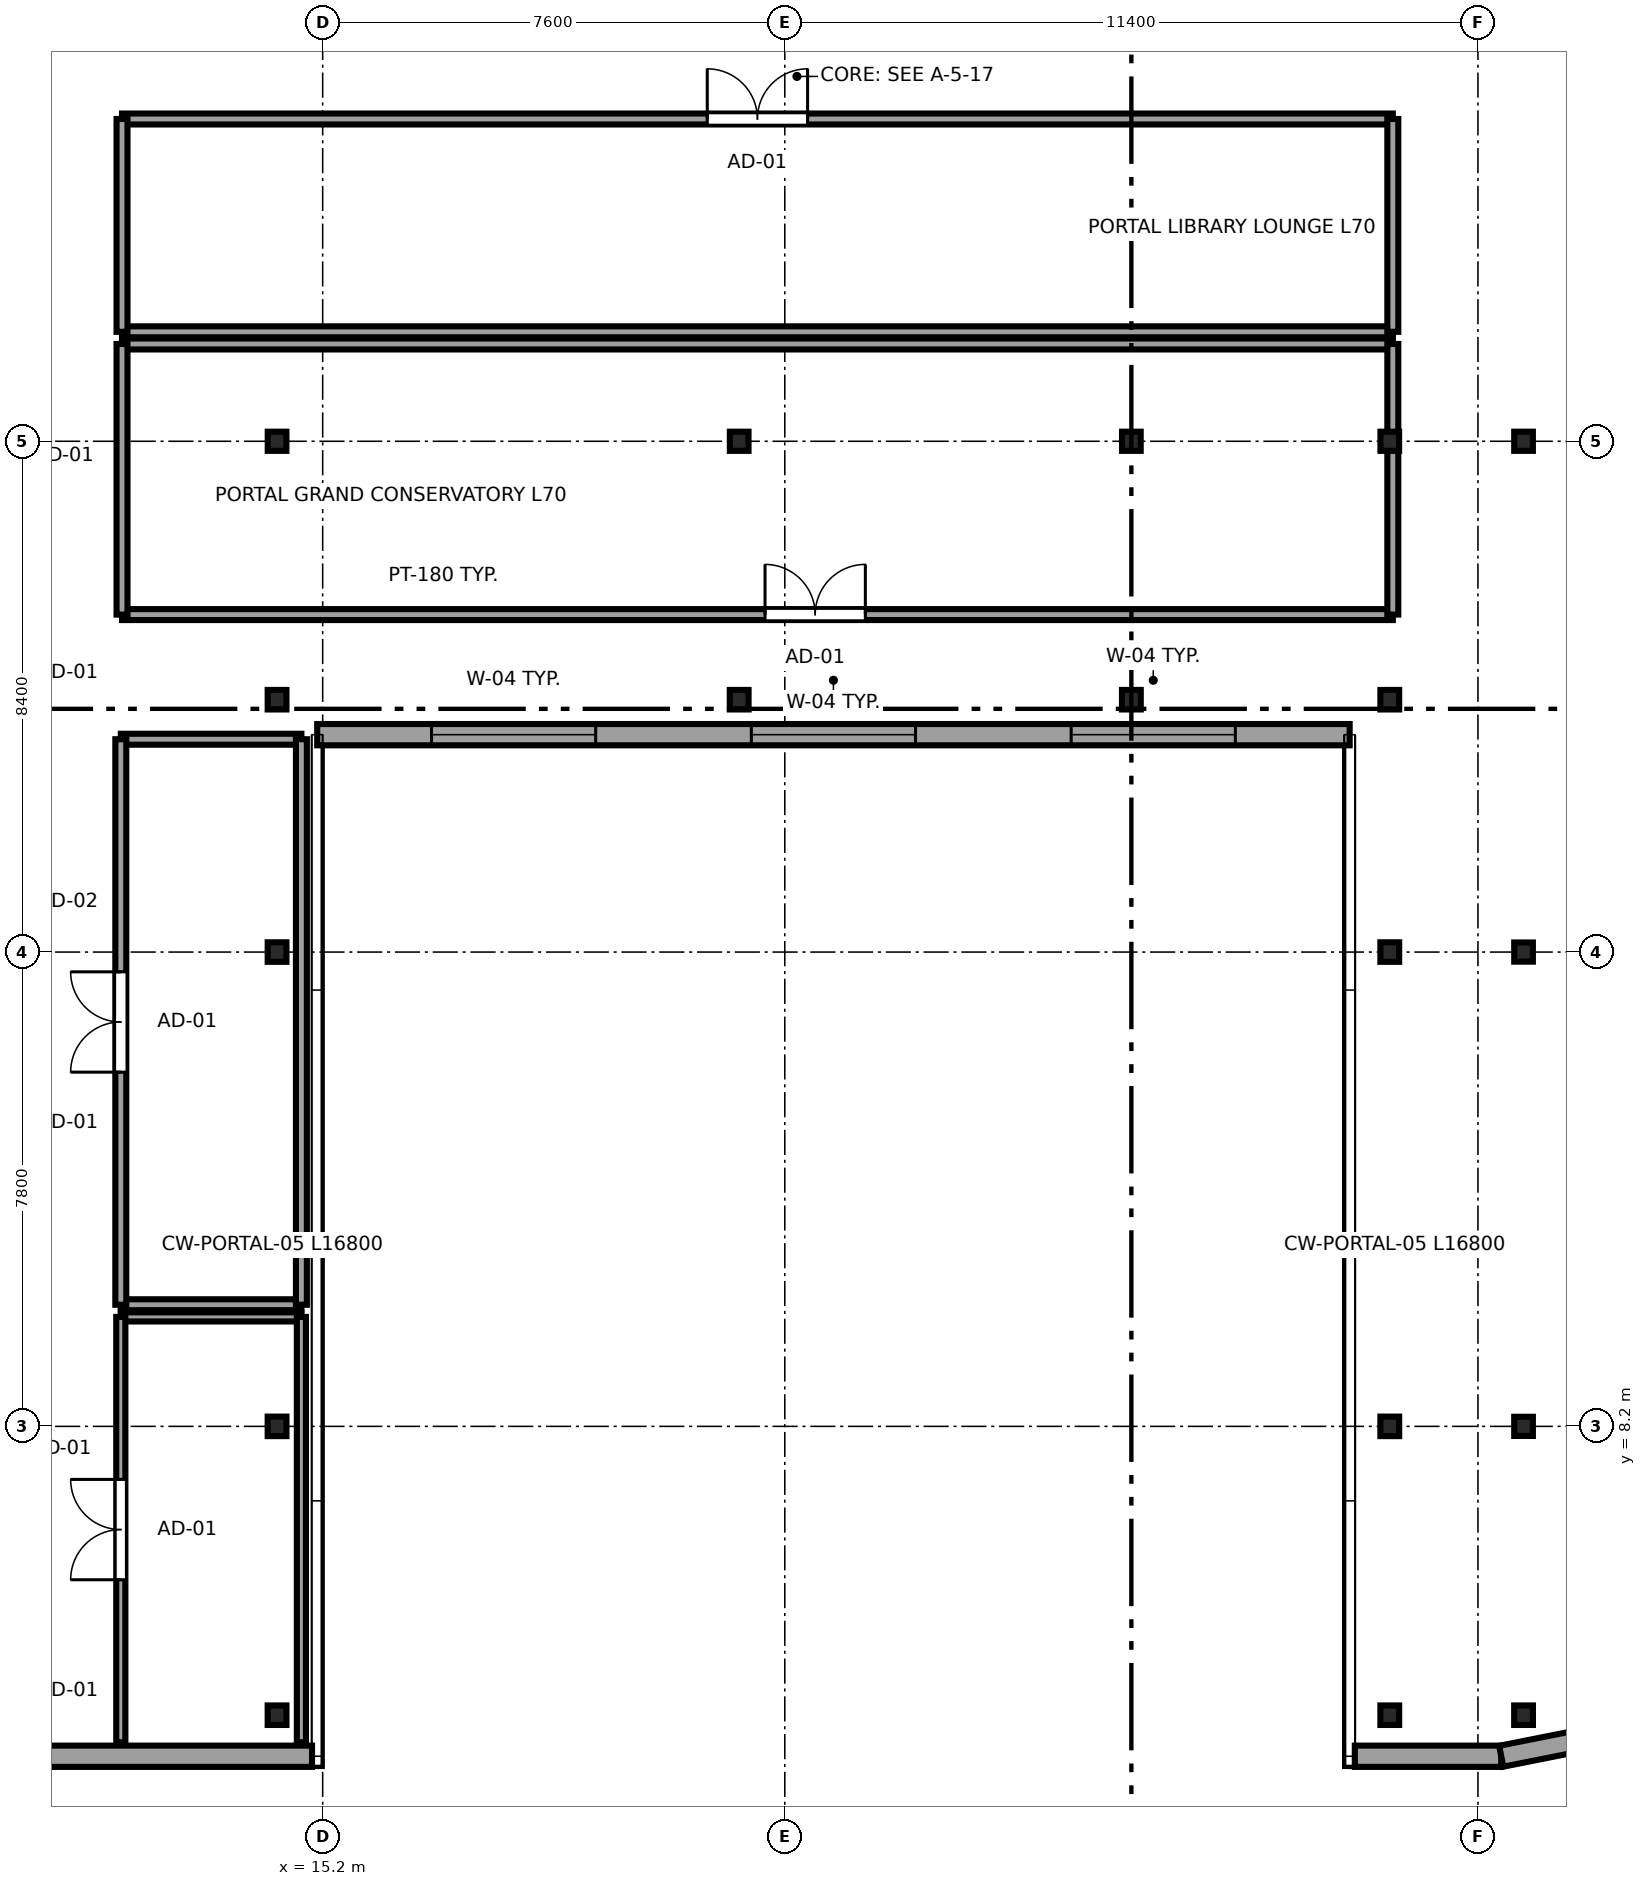
"""IFC4 building model, lengths in metres.
Left out: names, types, materials, properties, quantities, classifications, styles, units other than length and angle.
Written with IfcOpenShell. Run it as: python <this file> out.ifc"""

import sys

from ifc_helpers import new_model, si_unit, direction, frame, frame_2d, origin, origin_2d, place, context, subcontext, project, spatial, rectangle, i_section, extrude, source, transform, mapped, element, fill, save


model = new_model("IFC4")
c1 = context("Model", 3, precision=1e-05, world=origin(), true_north=direction((0.0, 1.0)))
c2 = subcontext(c1, "Body", "Model", "MODEL_VIEW")
j1 = project(units=[si_unit("LENGTHUNIT", "METRE"), si_unit("PLANEANGLEUNIT", "RADIAN")], contexts=[c1])
p1 = place(None, origin())
s1 = spatial("IfcSite", under=j1, at=p1, CompositionType="ELEMENT")
p2 = place(p1, origin())
s2 = spatial("IfcBuilding", under=s1, at=p2, CompositionType="ELEMENT")
p3 = place(p2, frame((0.0, 0.0, 262.95)))
s3 = spatial("IfcBuildingStorey", under=s2, at=p3, CompositionType="ELEMENT", Elevation=262.95)
m1 = source(origin(), c2, "Body", "SweptSolid", [
    extrude(i_section(OverallWidth=0.309, OverallDepth=0.321, WebThickness=0.014, FlangeThickness=0.022, FilletRadius=0.017, at=origin_2d()), origin(), (0.0, 0.0, 1.0), 3.55),
])
for number, where, z_axis, x_axis in (
    (1, (14.45, 3.45, 0.0), (0.0, 0.0, 1.0), (1.0, 0.0, 0.0)),
    (2, (14.45, 8.2, 0.0), (0.0, 0.0, 1.0), (1.0, 0.0, 0.0)),
    (3, (14.45, 16.0, 0.0), (0.0, 0.0, 1.0), (1.0, 0.0, 0.0)),
    (4, (32.75, 3.45, 0.0), (0.0, 0.0, 1.0), (1.0, 0.0, 0.0)),
    (5, (32.75, 8.2, 0.0), (0.0, 0.0, 1.0), (1.0, 0.0, 0.0)),
    (6, (32.75, 16.0, 0.0), (0.0, 0.0, 1.0), (1.0, 0.0, 0.0)),
    (7, (34.95, 3.45, 0.0), (0.0, 0.0, 1.0), (1.0, 0.0, 0.0)),
):
    element("IfcColumn", number, at=place(p3, frame(where, z_axis=z_axis, x_axis=x_axis)), inside=s3, PredefinedType="COLUMN", context=c2, shape_type="MappedRepresentation", body=[
        mapped(m1, transform((0.0, 0.0, 0.0), x_axis=(1.0, 0.0, 0.0), y_axis=(0.0, 1.0, 0.0), z_axis=(0.0, 0.0, 1.0), scale=1.0)),
    ])
m2 = source(origin(), c2, "Body", "SweptSolid", [
    extrude(i_section(OverallWidth=0.307, OverallDepth=0.315, WebThickness=0.012, FlangeThickness=0.019, FilletRadius=0.017, at=origin_2d()), origin(), (0.0, 0.0, 1.0), 3.55),
])
for number, where, z_axis, x_axis in (
    (8, (34.95, 8.2, 0.0), (0.0, 0.0, 1.0), (1.0, 0.0, 0.0)),
    (9, (34.95, 16.0, 0.0), (0.0, 0.0, 1.0), (1.0, 0.0, 0.0)),
    (10, (14.45, 24.4, 0.0), (0.0, 0.0, 1.0), (1.0, 0.0, 0.0)),
    (11, (22.05, 24.4, 0.0), (0.0, 0.0, 1.0), (1.0, 0.0, 0.0)),
    (12, (28.5, 24.4, 0.0), (0.0, 0.0, 1.0), (1.0, 0.0, 0.0)),
    (13, (32.75, 24.4, 0.0), (0.0, 0.0, 1.0), (1.0, 0.0, 0.0)),
    (14, (34.95, 24.4, 0.0), (0.0, 0.0, 1.0), (1.0, 0.0, 0.0)),
):
    element("IfcColumn", number, at=place(p3, frame(where, z_axis=z_axis, x_axis=x_axis)), inside=s3, PredefinedType="COLUMN", context=c2, shape_type="MappedRepresentation", body=[
        mapped(m2, transform((0.0, 0.0, 0.0), x_axis=(1.0, 0.0, 0.0), y_axis=(0.0, 1.0, 0.0), z_axis=(0.0, 0.0, 1.0), scale=1.0)),
    ])
for number, where, z_axis, x_axis in (
    (15, (14.45, 20.15, 0.0), (0.0, 0.0, 1.0), (1.0, 0.0, 0.0)),
    (16, (22.05, 20.15, 0.0), (0.0, 0.0, 1.0), (1.0, 0.0, 0.0)),
    (17, (28.5, 20.15, 0.0), (0.0, 0.0, 1.0), (1.0, 0.0, 0.0)),
    (18, (32.75, 20.15, 0.0), (0.0, 0.0, 1.0), (1.0, 0.0, 0.0)),
):
    element("IfcColumn", number, at=place(p3, frame(where, z_axis=z_axis, x_axis=x_axis)), inside=s3, PredefinedType="COLUMN", context=c2, shape_type="MappedRepresentation", body=[
        mapped(m1, transform((0.0, 0.0, 0.0), x_axis=(1.0, 0.0, 0.0), y_axis=(0.0, 1.0, 0.0), z_axis=(0.0, 0.0, 1.0), scale=1.0)),
    ])
p4 = place(p3, frame((7.017, 2.775, 0.0), z_axis=(0.0, 0.0, 1.0), x_axis=(1.0, 0.0, 0.0)))
e19 = element("IfcWall", 19, at=p4, inside=s3, PredefinedType="SOLIDWALL", context=c2, shape_type="SweptSolid", body=[
    extrude(rectangle(XDim=8.008, YDim=0.35, at=frame_2d((4.004, 0.0))), origin(), (0.0, 0.0, 1.0), 3.37),
])
p5 = place(p4, frame((0.791, 0.0, 0.62)))
e20 = element("IfcOpeningElement", 20, at=p5, cuts=e19, PredefinedType="OPENING", context=c2, shape_type="SweptSolid", body=[
    extrude(rectangle(XDim=1.5, YDim=1.55, at=frame_2d((0.75, 0.775))), frame((0.0, 0.185, 0.0), z_axis=(0.0, -1.0, 0.0), x_axis=(1.0, 0.0, 0.0)), (0.0, 0.0, 1.0), 0.37),
])
p6 = place(p3, frame((15.11, 19.575, 0.0), z_axis=(0.0, 0.0, 1.0), x_axis=(1.0, 0.0, 0.0)))
e21 = element("IfcWall", 21, at=p6, inside=s3, PredefinedType="SOLIDWALL", context=c2, shape_type="SweptSolid", body=[
    extrude(rectangle(XDim=16.98, YDim=0.35, at=frame_2d((8.49, 0.0))), origin(), (0.0, 0.0, 1.0), 3.37),
])
p7 = place(p6, frame((1.88, 0.0, 0.68)))
e22 = element("IfcOpeningElement", 22, at=p7, cuts=e21, PredefinedType="OPENING", context=c2, shape_type="SweptSolid", body=[
    extrude(rectangle(XDim=2.7, YDim=1.95, at=frame_2d((1.35, 0.975))), frame((0.0, 0.185, 0.0), z_axis=(0.0, -1.0, 0.0), x_axis=(1.0, 0.0, 0.0)), (0.0, 0.0, 1.0), 0.37),
])
p8 = place(p6, frame((7.14, 0.0, 0.68)))
e23 = element("IfcOpeningElement", 23, at=p8, cuts=e21, PredefinedType="OPENING", context=c2, shape_type="SweptSolid", body=[
    extrude(rectangle(XDim=2.7, YDim=1.95, at=frame_2d((1.35, 0.975))), frame((0.0, 0.185, 0.0), z_axis=(0.0, -1.0, 0.0), x_axis=(1.0, 0.0, 0.0)), (0.0, 0.0, 1.0), 0.37),
])
p9 = place(p6, frame((12.4, 0.0, 0.68)))
e24 = element("IfcOpeningElement", 24, at=p9, cuts=e21, PredefinedType="OPENING", context=c2, shape_type="SweptSolid", body=[
    extrude(rectangle(XDim=2.7, YDim=1.95, at=frame_2d((1.35, 0.975))), frame((0.0, 0.185, 0.0), z_axis=(0.0, -1.0, 0.0), x_axis=(1.0, 0.0, 0.0)), (0.0, 0.0, 1.0), 0.37),
])
p10 = place(p3, frame((32.175, 2.775, 0.0), z_axis=(0.0, 0.0, 1.0), x_axis=(1.0, 0.0, 0.0)))
e25 = element("IfcWall", 25, at=p10, inside=s3, PredefinedType="SOLIDWALL", context=c2, shape_type="SweptSolid", body=[
    extrude(rectangle(XDim=2.408, YDim=0.35, at=frame_2d((1.204, 0.0))), origin(), (0.0, 0.0, 1.0), 3.37),
])
p11 = place(p3, frame((34.583, 2.775, 0.0), z_axis=(0.0, 0.0, 1.0), x_axis=(0.980794424524, 0.195044345786, 0.0)))
e26 = element("IfcWall", 26, at=p11, inside=s3, PredefinedType="SOLIDWALL", context=c2, shape_type="SweptSolid", body=[
    extrude(rectangle(XDim=1.665, YDim=0.35, at=frame_2d((0.833, 0.0))), origin(), (0.0, 0.0, 1.0), 3.37),
])
for number, where, z_axis, x_axis in (
    (27, (11.88, 10.2, 0.0), (0.0, 0.0, 1.0), (1.0, 0.0, 0.0)),
    (28, (11.88, 19.5, 0.0), (0.0, 0.0, 1.0), (1.0, 0.0, 0.0)),
):
    element("IfcWall", number, at=place(p3, frame(where, z_axis=z_axis, x_axis=x_axis)), inside=s3, PredefinedType="PARTITIONING", context=c2, shape_type="SweptSolid", body=[
        extrude(rectangle(XDim=2.97, YDim=0.18, at=frame_2d((1.485, 0.0))), origin(), (0.0, 0.0, 1.0), 3.37),
    ])
p12 = place(p3, frame((11.88, 10.2, 0.0), z_axis=(0.0, 0.0, 1.0), x_axis=(0.0, 1.0, 0.0)))
e29 = element("IfcWall", 29, at=p12, inside=s3, PredefinedType="PARTITIONING", context=c2, shape_type="SweptSolid", body=[
    extrude(rectangle(XDim=9.3, YDim=0.18, at=frame_2d((4.65, 0.0))), origin(), (0.0, 0.0, 1.0), 3.37),
])
p13 = place(p12, frame((3.825, 0.0, 0.0)))
e30 = element("IfcOpeningElement", 30, at=p13, cuts=e29, PredefinedType="OPENING", context=c2, shape_type="SweptSolid", body=[
    extrude(rectangle(XDim=1.65, YDim=2.15, at=frame_2d((0.825, 1.075))), frame((0.0, 0.1, 0.0), z_axis=(0.0, -1.0, 0.0), x_axis=(1.0, 0.0, 0.0)), (0.0, 0.0, 1.0), 0.2),
])
p14 = place(p3, frame((14.85, 10.2, 0.0), z_axis=(0.0, 0.0, 1.0), x_axis=(0.0, 1.0, 0.0)))
e31 = element("IfcWall", 31, at=p14, inside=s3, PredefinedType="PARTITIONING", context=c2, shape_type="SweptSolid", body=[
    extrude(rectangle(XDim=9.3, YDim=0.18, at=frame_2d((4.65, 0.0))), origin(), (0.0, 0.0, 1.0), 3.37),
])
p15 = place(p3, frame((11.88, 10.0, 0.0), z_axis=(0.0, 0.0, 1.0), x_axis=(1.0, 0.0, 0.0)))
e32 = element("IfcWall", 32, at=p15, inside=s3, PredefinedType="PARTITIONING", context=c2, shape_type="SweptSolid", body=[
    extrude(rectangle(XDim=2.97, YDim=0.15, at=frame_2d((1.485, 0.0))), origin(), (0.0, 0.0, 1.0), 3.37),
])
p16 = place(p3, frame((11.88, 3.005, 0.0), z_axis=(0.0, 0.0, 1.0), x_axis=(0.0, 1.0, 0.0)))
e33 = element("IfcWall", 33, at=p16, inside=s3, PredefinedType="PARTITIONING", context=c2, shape_type="SweptSolid", body=[
    extrude(rectangle(XDim=6.995, YDim=0.15, at=frame_2d((3.498, 0.0))), origin(), (0.0, 0.0, 1.0), 3.37),
])
p17 = place(p16, frame((2.673, 0.0, 0.0)))
e34 = element("IfcOpeningElement", 34, at=p17, cuts=e33, PredefinedType="OPENING", context=c2, shape_type="SweptSolid", body=[
    extrude(rectangle(XDim=1.65, YDim=2.15, at=frame_2d((0.825, 1.075))), frame((0.0, 0.085, 0.0), z_axis=(0.0, -1.0, 0.0), x_axis=(1.0, 0.0, 0.0)), (0.0, 0.0, 1.0), 0.17),
])
p18 = place(p3, frame((14.85, 3.005, 0.0), z_axis=(0.0, 0.0, 1.0), x_axis=(0.0, 1.0, 0.0)))
e35 = element("IfcWall", 35, at=p18, inside=s3, PredefinedType="PARTITIONING", context=c2, shape_type="SweptSolid", body=[
    extrude(rectangle(XDim=6.995, YDim=0.15, at=frame_2d((3.498, 0.0))), origin(), (0.0, 0.0, 1.0), 3.37),
])
p19 = place(p3, frame((11.9, 21.55, 0.0), z_axis=(0.0, 0.0, 1.0), x_axis=(1.0, 0.0, 0.0)))
e36 = element("IfcWall", 36, at=p19, inside=s3, PredefinedType="PARTITIONING", context=c2, shape_type="SweptSolid", body=[
    extrude(rectangle(XDim=20.9, YDim=0.18, at=frame_2d((10.45, 0.0))), origin(), (0.0, 0.0, 1.0), 3.37),
])
p20 = place(p19, frame((10.575, 0.0, 0.0)))
e37 = element("IfcOpeningElement", 37, at=p20, cuts=e36, PredefinedType="OPENING", context=c2, shape_type="SweptSolid", body=[
    extrude(rectangle(XDim=1.65, YDim=2.15, at=frame_2d((0.825, 1.075))), frame((0.0, 0.1, 0.0), z_axis=(0.0, -1.0, 0.0), x_axis=(1.0, 0.0, 0.0)), (0.0, 0.0, 1.0), 0.2),
])
p21 = place(p3, frame((11.9, 26.0, 0.0), z_axis=(0.0, 0.0, 1.0), x_axis=(1.0, 0.0, 0.0)))
e38 = element("IfcWall", 38, at=p21, inside=s3, PredefinedType="PARTITIONING", context=c2, shape_type="SweptSolid", body=[
    extrude(rectangle(XDim=20.9, YDim=0.18, at=frame_2d((10.45, 0.0))), origin(), (0.0, 0.0, 1.0), 3.37),
])
p22 = place(p3, frame((11.9, 21.55, 0.0), z_axis=(0.0, 0.0, 1.0), x_axis=(0.0, 1.0, 0.0)))
e39 = element("IfcWall", 39, at=p22, inside=s3, PredefinedType="PARTITIONING", context=c2, shape_type="SweptSolid", body=[
    extrude(rectangle(XDim=4.45, YDim=0.18, at=frame_2d((2.225, 0.0))), origin(), (0.0, 0.0, 1.0), 3.37),
])
p23 = place(p3, frame((32.8, 21.55, 0.0), z_axis=(0.0, 0.0, 1.0), x_axis=(0.0, 1.0, 0.0)))
e40 = element("IfcWall", 40, at=p23, inside=s3, PredefinedType="PARTITIONING", context=c2, shape_type="SweptSolid", body=[
    extrude(rectangle(XDim=4.45, YDim=0.18, at=frame_2d((2.225, 0.0))), origin(), (0.0, 0.0, 1.0), 2.827),
])
p24 = place(p3, frame((11.9, 26.2, 0.0), z_axis=(0.0, 0.0, 1.0), x_axis=(1.0, 0.0, 0.0)))
e41 = element("IfcWall", 41, at=p24, inside=s3, PredefinedType="PARTITIONING", context=c2, shape_type="SweptSolid", body=[
    extrude(rectangle(XDim=20.9, YDim=0.18, at=frame_2d((10.45, 0.0))), origin(), (0.0, 0.0, 1.0), 3.37),
])
p25 = place(p3, frame((11.9, 29.7, 0.0), z_axis=(0.0, 0.0, 1.0), x_axis=(1.0, 0.0, 0.0)))
e42 = element("IfcWall", 42, at=p25, inside=s3, PredefinedType="PARTITIONING", context=c2, shape_type="SweptSolid", body=[
    extrude(rectangle(XDim=20.9, YDim=0.18, at=frame_2d((10.45, 0.0))), origin(), (0.0, 0.0, 1.0), 3.37),
])
p26 = place(p25, frame((9.625, 0.0, 0.0)))
e43 = element("IfcOpeningElement", 43, at=p26, cuts=e42, PredefinedType="OPENING", context=c2, shape_type="SweptSolid", body=[
    extrude(rectangle(XDim=1.65, YDim=2.15, at=frame_2d((0.825, 1.075))), frame((0.0, 0.1, 0.0), z_axis=(0.0, -1.0, 0.0), x_axis=(1.0, 0.0, 0.0)), (0.0, 0.0, 1.0), 0.2),
])
p27 = place(p3, frame((11.9, 26.2, 0.0), z_axis=(0.0, 0.0, 1.0), x_axis=(0.0, 1.0, 0.0)))
e44 = element("IfcWall", 44, at=p27, inside=s3, PredefinedType="PARTITIONING", context=c2, shape_type="SweptSolid", body=[
    extrude(rectangle(XDim=3.5, YDim=0.18, at=frame_2d((1.75, 0.0))), origin(), (0.0, 0.0, 1.0), 3.37),
])
p28 = place(p3, frame((32.8, 26.2, 0.0), z_axis=(0.0, 0.0, 1.0), x_axis=(0.0, 1.0, 0.0)))
e45 = element("IfcWall", 45, at=p28, inside=s3, PredefinedType="PARTITIONING", context=c2, shape_type="SweptSolid", body=[
    extrude(rectangle(XDim=3.5, YDim=0.18, at=frame_2d((1.75, 0.0))), origin(), (0.0, 0.0, 1.0), 2.827),
])
m3 = source(origin(), c2, "Body", "SweptSolid", [
    extrude(rectangle(XDim=2.7, YDim=1.95, at=frame_2d((1.35, 0.975))), frame((0.0, 0.09, 0.0), z_axis=(0.0, -1.0, 0.0), x_axis=(1.0, 0.0, 0.0)), (0.0, 0.0, 1.0), 0.06),
])
p29 = place(p7, origin())
e46 = element("IfcWindow", 46, at=p29, inside=s3, PartitioningType="TRIPLE_PANEL_HORIZONTAL", PredefinedType="WINDOW", context=c2, shape_type="MappedRepresentation", body=[
    mapped(m3, transform((0.0, 0.0, 0.0), x_axis=(1.0, 0.0, 0.0), y_axis=(0.0, 1.0, 0.0), z_axis=(0.0, 0.0, 1.0), scale=1.0)),
])
fill(e22, e46)
p30 = place(p8, origin())
e47 = element("IfcWindow", 47, at=p30, inside=s3, PartitioningType="TRIPLE_PANEL_HORIZONTAL", PredefinedType="WINDOW", context=c2, shape_type="MappedRepresentation", body=[
    mapped(m3, transform((0.0, 0.0, 0.0), x_axis=(1.0, 0.0, 0.0), y_axis=(0.0, 1.0, 0.0), z_axis=(0.0, 0.0, 1.0), scale=1.0)),
])
fill(e23, e47)
p31 = place(p9, origin())
e48 = element("IfcWindow", 48, at=p31, inside=s3, PartitioningType="TRIPLE_PANEL_HORIZONTAL", PredefinedType="WINDOW", context=c2, shape_type="MappedRepresentation", body=[
    mapped(m3, transform((0.0, 0.0, 0.0), x_axis=(1.0, 0.0, 0.0), y_axis=(0.0, 1.0, 0.0), z_axis=(0.0, 0.0, 1.0), scale=1.0)),
])
fill(e24, e48)
m4 = source(origin(), c2, "Body", "SweptSolid", [
    extrude(rectangle(XDim=1.65, YDim=2.15, at=frame_2d((0.825, 1.075))), frame((0.0, 0.025, 0.0), z_axis=(0.0, -1.0, 0.0), x_axis=(1.0, 0.0, 0.0)), (0.0, 0.0, 1.0), 0.05),
])
p32 = place(p13, origin())
e49 = element("IfcDoor", 49, at=p32, inside=s3, OperationType="DOUBLE_DOOR_SINGLE_SWING", PredefinedType="DOOR", context=c2, shape_type="MappedRepresentation", body=[
    mapped(m4, transform((0.0, 0.0, 0.0), x_axis=(1.0, 0.0, 0.0), y_axis=(0.0, 1.0, 0.0), z_axis=(0.0, 0.0, 1.0), scale=1.0)),
])
fill(e30, e49)
p33 = place(p17, origin())
e50 = element("IfcDoor", 50, at=p33, inside=s3, OperationType="DOUBLE_DOOR_SINGLE_SWING", PredefinedType="DOOR", context=c2, shape_type="MappedRepresentation", body=[
    mapped(m4, transform((0.0, 0.0, 0.0), x_axis=(1.0, 0.0, 0.0), y_axis=(0.0, 1.0, 0.0), z_axis=(0.0, 0.0, 1.0), scale=1.0)),
])
fill(e34, e50)
p34 = place(p20, origin())
e51 = element("IfcDoor", 51, at=p34, inside=s3, OperationType="DOUBLE_DOOR_SINGLE_SWING", PredefinedType="DOOR", context=c2, shape_type="MappedRepresentation", body=[
    mapped(m4, transform((0.0, 0.0, 0.0), x_axis=(1.0, 0.0, 0.0), y_axis=(0.0, 1.0, 0.0), z_axis=(0.0, 0.0, 1.0), scale=1.0)),
])
fill(e37, e51)
p35 = place(p26, origin())
e52 = element("IfcDoor", 52, at=p35, inside=s3, OperationType="DOUBLE_DOOR_SINGLE_SWING", PredefinedType="DOOR", context=c2, shape_type="MappedRepresentation", body=[
    mapped(m4, transform((0.0, 0.0, 0.0), x_axis=(1.0, 0.0, 0.0), y_axis=(0.0, 1.0, 0.0), z_axis=(0.0, 0.0, 1.0), scale=1.0)),
])
fill(e43, e52)
save(model, sys.argv[1])
